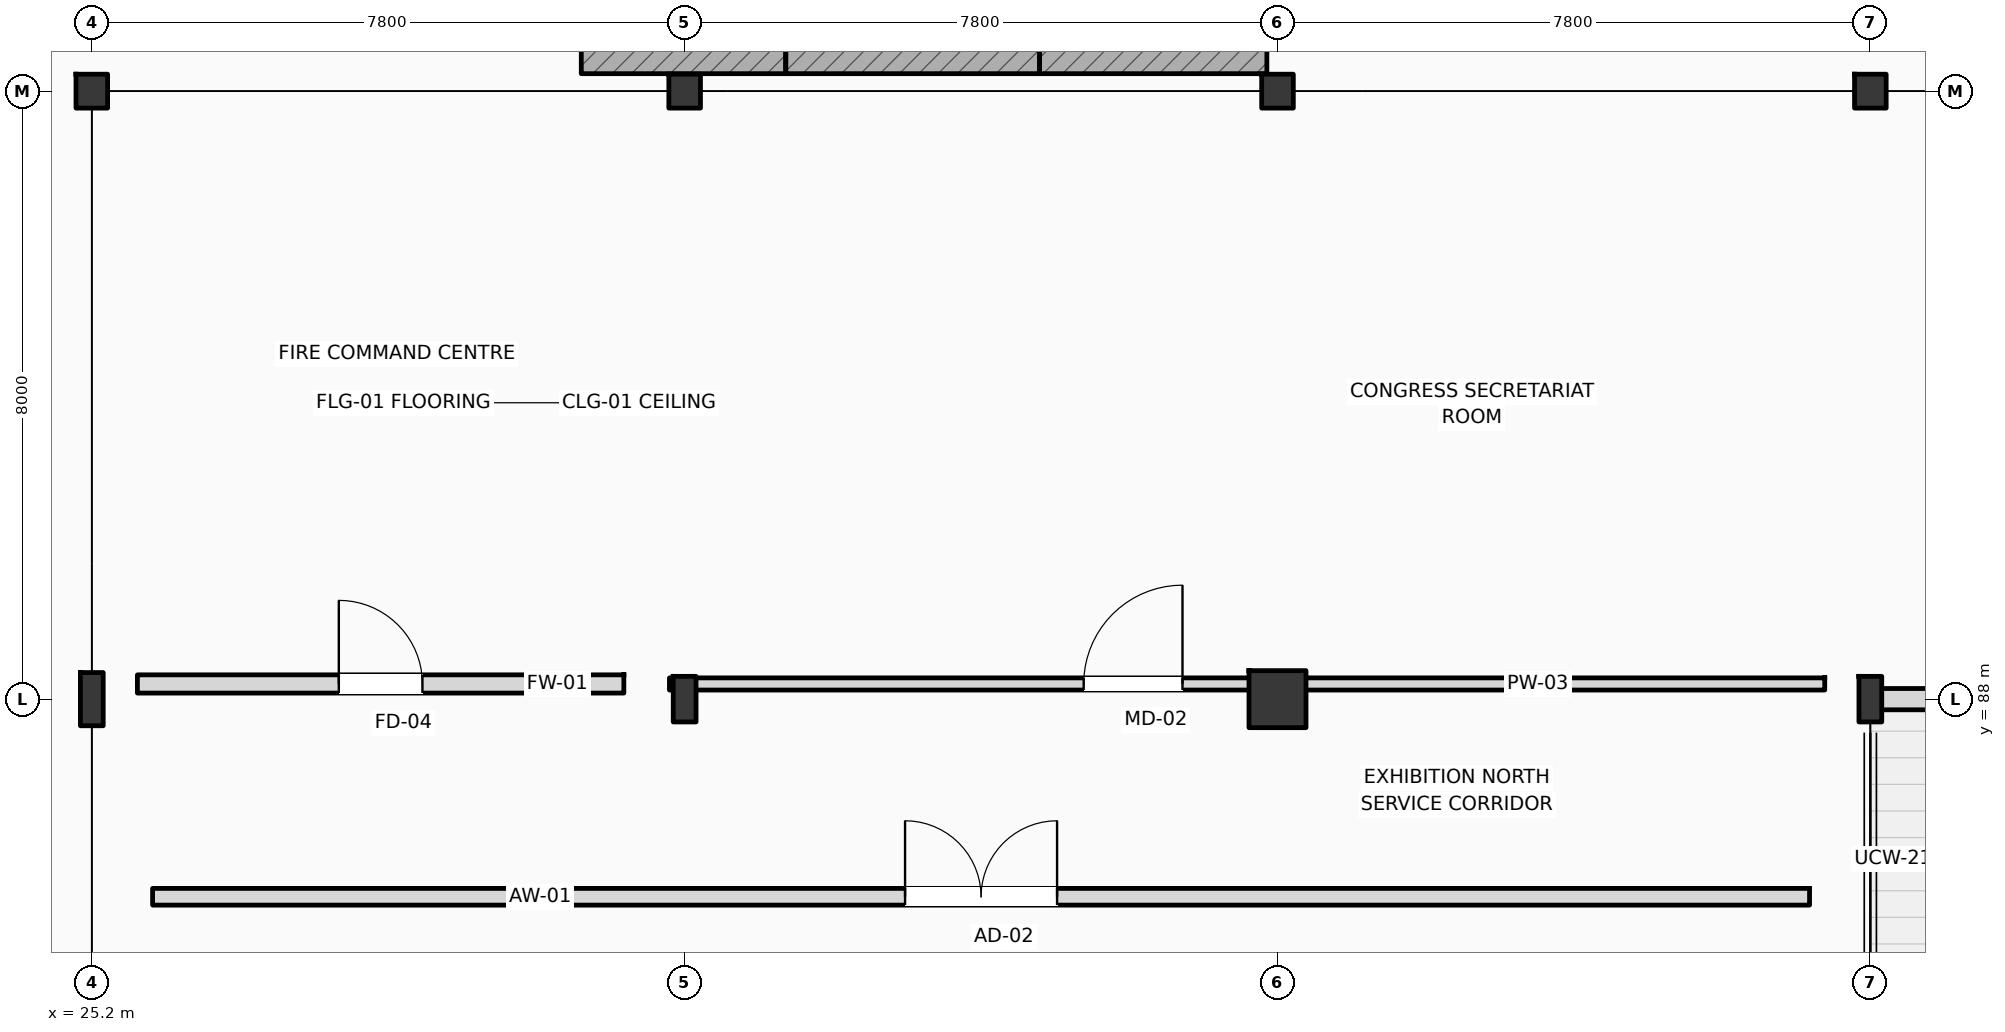
"""IFC4 building model, lengths in metres.
Left out: names, types, materials, properties, quantities, classifications, styles, units other than length and angle.
Written with IfcOpenShell. Run it as: python <this file> out.ifc"""

import sys

from ifc_helpers import new_model, si_unit, direction, frame, frame_2d, origin, origin_2d, place, context, subcontext, project, spatial, rectangle, i_section, extrude, element, fill, save


model = new_model("IFC4")
c1 = context("Model", 3, precision=1e-05, world=origin(), true_north=direction((0.0, 1.0)))
c2 = subcontext(c1, "Body", "Model", "MODEL_VIEW")
j1 = project(units=[si_unit("LENGTHUNIT", "METRE"), si_unit("PLANEANGLEUNIT", "RADIAN")], contexts=[c1])
p1 = place(None, origin())
s1 = spatial("IfcSite", under=j1, at=p1, CompositionType="ELEMENT")
p2 = place(p1, origin())
s2 = spatial("IfcBuilding", under=s1, at=p2, CompositionType="ELEMENT")
p3 = place(p2, origin())
s3 = spatial("IfcBuildingStorey", under=s2, at=p3, CompositionType="ELEMENT", Elevation=0.0)
p4 = place(p3, frame((25.2, 88.0, 0.0), z_axis=(0.0, 0.0, 1.0), x_axis=(1.0, 0.0, 0.0)))
e1 = element("IfcColumn", 1, at=p4, inside=s3, PredefinedType="COLUMN", context=c2, shape_type="SweptSolid", body=[
    extrude(i_section(OverallWidth=0.3, OverallDepth=0.7, WebThickness=0.017, FlangeThickness=0.032, FilletRadius=0.027, at=origin_2d()), origin(), (0.0, 0.0, 1.0), 6.0),
])
for number, where, z_axis, x_axis in (
    (2, (25.2, 96.0, 0.0), (0.0, 0.0, 1.0), (1.0, 0.0, 0.0)),
    (3, (33.0, 96.0, 0.0), (0.0, 0.0, 1.0), (1.0, 0.0, 0.0)),
    (4, (40.8, 96.0, 0.0), (0.0, 0.0, 1.0), (1.0, 0.0, 0.0)),
    (5, (48.6, 96.0, 0.0), (0.0, 0.0, 1.0), (1.0, 0.0, 0.0)),
):
    element("IfcColumn", number, at=place(p3, frame(where, z_axis=z_axis, x_axis=x_axis)), inside=s3, PredefinedType="COLUMN", context=c2, shape_type="SweptSolid", body=[
        extrude(i_section(OverallWidth=0.416, OverallDepth=0.446, WebThickness=0.036, FlangeThickness=0.048, FilletRadius=0.015, at=origin_2d()), origin(), (0.0, 0.0, 1.0), 6.0),
    ])
p5 = place(p3, frame((33.0, 88.0, 0.0), z_axis=(0.0, 0.0, 1.0), x_axis=(1.0, 0.0, 0.0)))
e6 = element("IfcColumn", 6, at=p5, inside=s3, PredefinedType="COLUMN", context=c2, shape_type="SweptSolid", body=[
    extrude(i_section(OverallWidth=0.3, OverallDepth=0.6, WebThickness=0.015, FlangeThickness=0.03, FilletRadius=0.027, at=origin_2d()), origin(), (0.0, 0.0, 1.0), 6.0),
])
p6 = place(p3, frame((40.8, 88.0, 0.0), z_axis=(0.0, 0.0, 1.0), x_axis=(1.0, 0.0, 0.0)))
e7 = element("IfcColumn", 7, at=p6, inside=s3, PredefinedType="COLUMN", context=c2, shape_type="SweptSolid", body=[
    extrude(rectangle(XDim=0.75, YDim=0.75, at=origin_2d()), origin(), (0.0, 0.0, 1.0), 6.0),
])
p7 = place(p3, frame((48.6, 88.0, 0.0), z_axis=(0.0, 0.0, 1.0), x_axis=(1.0, 0.0, 0.0)))
e8 = element("IfcColumn", 8, at=p7, inside=s3, PredefinedType="COLUMN", context=c2, shape_type="SweptSolid", body=[
    extrude(i_section(OverallWidth=0.3, OverallDepth=0.6, WebThickness=0.015, FlangeThickness=0.03, FilletRadius=0.027, at=origin_2d()), origin(), (0.0, 0.0, 1.0), 6.0),
])
p8 = place(p3, frame((48.6, 88.0, 0.0), z_axis=(0.0, 0.0, 1.0), x_axis=(1.0, 0.0, 0.0)))
e9 = element("IfcWall", 9, at=p8, inside=s3, PredefinedType="STANDARD", context=c2, shape_type="SweptSolid", body=[
    extrude(rectangle(XDim=7.8, YDim=0.28, at=frame_2d((3.9, 0.0))), origin(), (0.0, 0.0, 1.0), 5.19),
])
p9 = place(p8, frame((3.0, 0.0, 0.0)))
e10 = element("IfcOpeningElement", 10, at=p9, cuts=e9, PredefinedType="OPENING", context=c2, shape_type="SweptSolid", body=[
    extrude(rectangle(XDim=1.8, YDim=2.4, at=frame_2d((0.9, 1.2))), frame((0.0, 0.15, 0.0), z_axis=(0.0, -1.0, 0.0), x_axis=(1.0, 0.0, 0.0)), (0.0, 0.0, 1.0), 0.3),
])
p10 = place(p3, frame((31.64, 96.405, 0.0), z_axis=(0.0, 0.0, 1.0), x_axis=(1.0, 0.0, 0.0)))
e11 = element("IfcWall", 11, at=p10, inside=s3, PredefinedType="SHEAR", context=c2, shape_type="SweptSolid", body=[
    extrude(rectangle(XDim=2.69, YDim=0.35, at=frame_2d((1.345, 0.0))), origin(), (0.0, 0.0, 1.0), 5.7),
])
p11 = place(p3, frame((34.33, 96.405, 0.0), z_axis=(0.0, 0.0, 1.0), x_axis=(1.0, 0.0, 0.0)))
e12 = element("IfcWall", 12, at=p11, inside=s3, PredefinedType="SHEAR", context=c2, shape_type="SweptSolid", body=[
    extrude(rectangle(XDim=3.34, YDim=0.35, at=frame_2d((1.67, 0.0))), origin(), (0.0, 0.0, 1.0), 5.7),
])
p12 = place(p3, frame((37.67, 96.405, 0.0), z_axis=(0.0, 0.0, 1.0), x_axis=(1.0, 0.0, 0.0)))
e13 = element("IfcWall", 13, at=p12, inside=s3, PredefinedType="SHEAR", context=c2, shape_type="SweptSolid", body=[
    extrude(rectangle(XDim=2.99, YDim=0.35, at=frame_2d((1.495, 0.0))), origin(), (0.0, 0.0, 1.0), 5.7),
])
p13 = place(p3, frame((26.0, 85.4, 0.0), z_axis=(0.0, 0.0, 1.0), x_axis=(1.0, 0.0, 0.0)))
e14 = element("IfcWall", 14, at=p13, inside=s3, PredefinedType="PARTITIONING", context=c2, shape_type="SweptSolid", body=[
    extrude(rectangle(XDim=21.8, YDim=0.22, at=frame_2d((10.9, 0.0))), origin(), (0.0, 0.0, 1.0), 5.7),
])
p14 = place(p13, frame((9.9, 0.0, 0.0)))
e15 = element("IfcOpeningElement", 15, at=p14, cuts=e14, PredefinedType="OPENING", context=c2, shape_type="SweptSolid", body=[
    extrude(rectangle(XDim=2.0, YDim=2.35, at=frame_2d((1.0, 1.175))), frame((0.0, 0.12, 0.0), z_axis=(0.0, -1.0, 0.0), x_axis=(1.0, 0.0, 0.0)), (0.0, 0.0, 1.0), 0.24),
])
p15 = place(p3, frame((25.8, 88.2, 0.0), z_axis=(0.0, 0.0, 1.0), x_axis=(1.0, 0.0, 0.0)))
e16 = element("IfcWall", 16, at=p15, inside=s3, PredefinedType="STANDARD", context=c2, shape_type="SweptSolid", body=[
    extrude(rectangle(XDim=6.4, YDim=0.24, at=frame_2d((3.2, 0.0))), origin(), (0.0, 0.0, 1.0), 5.19),
])
p16 = place(p15, frame((2.65, 0.0, 0.0)))
e17 = element("IfcOpeningElement", 17, at=p16, cuts=e16, PredefinedType="OPENING", context=c2, shape_type="SweptSolid", body=[
    extrude(rectangle(XDim=1.1, YDim=2.2, at=frame_2d((0.55, 1.1))), frame((0.0, 0.13, 0.0), z_axis=(0.0, -1.0, 0.0), x_axis=(1.0, 0.0, 0.0)), (0.0, 0.0, 1.0), 0.26),
])
p17 = place(p3, frame((32.8, 88.2, 0.0), z_axis=(0.0, 0.0, 1.0), x_axis=(1.0, 0.0, 0.0)))
e18 = element("IfcWall", 18, at=p17, inside=s3, PredefinedType="PARTITIONING", context=c2, shape_type="SweptSolid", body=[
    extrude(rectangle(XDim=15.2, YDim=0.16, at=frame_2d((7.6, 0.0))), origin(), (0.0, 0.0, 1.0), 5.19),
])
p18 = place(p17, frame((5.45, 0.0, 0.0)))
e19 = element("IfcOpeningElement", 19, at=p18, cuts=e18, PredefinedType="OPENING", context=c2, shape_type="SweptSolid", body=[
    extrude(rectangle(XDim=1.3, YDim=2.2, at=frame_2d((0.65, 1.1))), frame((0.0, 0.09, 0.0), z_axis=(0.0, -1.0, 0.0), x_axis=(1.0, 0.0, 0.0)), (0.0, 0.0, 1.0), 0.18),
])
p19 = place(p14, origin())
e20 = element("IfcDoor", 20, at=p19, inside=s3, OperationType="DOUBLE_SWING_LEFT", PredefinedType="DOOR", context=c2, shape_type="SweptSolid", body=[
    extrude(rectangle(XDim=2.0, YDim=2.35, at=frame_2d((1.0, 1.175))), frame((0.0, 0.025, 0.0), z_axis=(0.0, -1.0, 0.0), x_axis=(1.0, 0.0, 0.0)), (0.0, 0.0, 1.0), 0.05),
])
fill(e15, e20)
p20 = place(p16, origin())
e21 = element("IfcDoor", 21, at=p20, inside=s3, OperationType="SINGLE_SWING_LEFT", PredefinedType="DOOR", context=c2, shape_type="SweptSolid", body=[
    extrude(rectangle(XDim=1.1, YDim=2.2, at=frame_2d((0.55, 1.1))), frame((0.0, 0.025, 0.0), z_axis=(0.0, -1.0, 0.0), x_axis=(1.0, 0.0, 0.0)), (0.0, 0.0, 1.0), 0.05),
])
fill(e17, e21)
p21 = place(p18, origin())
e22 = element("IfcDoor", 22, at=p21, inside=s3, OperationType="SINGLE_SWING_RIGHT", PredefinedType="DOOR", context=c2, shape_type="SweptSolid", body=[
    extrude(rectangle(XDim=1.3, YDim=2.2, at=frame_2d((0.65, 1.1))), frame((0.0, 0.025, 0.0), z_axis=(0.0, -1.0, 0.0), x_axis=(1.0, 0.0, 0.0)), (0.0, 0.0, 1.0), 0.05),
])
fill(e19, e22)
save(model, sys.argv[1])
